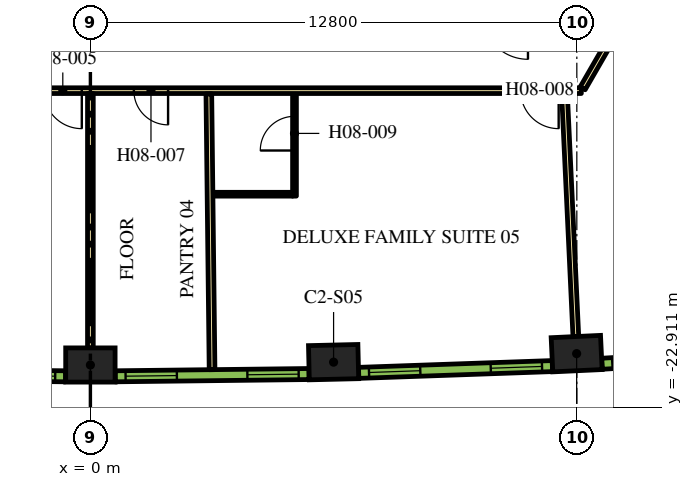
"""IFC4 building model, lengths in metres.
Left out: names, types, materials, properties, quantities, classifications, styles, units other than length and angle.
Written with IfcOpenShell. Run it as: python <this file> out.ifc"""

import sys

from ifc_helpers import new_model, si_unit, direction, frame, frame_2d, origin, origin_2d, place, context, subcontext, project, spatial, rectangle, extrude, element, fill, save


model = new_model("IFC4")
c1 = context("Model", 3, precision=1e-05, world=origin(), true_north=direction((0.0, 1.0)))
c2 = subcontext(c1, "Body", "Model", "MODEL_VIEW")
j1 = project(units=[si_unit("LENGTHUNIT", "METRE"), si_unit("PLANEANGLEUNIT", "RADIAN")], contexts=[c1])
p1 = place(None, origin())
s1 = spatial("IfcSite", under=j1, at=p1, CompositionType="ELEMENT")
p2 = place(p1, origin())
s2 = spatial("IfcBuilding", under=s1, at=p2, CompositionType="ELEMENT")
p3 = place(p2, frame((0.0, 0.0, 114.9)))
s3 = spatial("IfcBuildingStorey", under=s2, at=p3, CompositionType="ELEMENT", Elevation=114.9)
for number, where, z_axis, x_axis in (
    (1, (0.0, -21.794, 0.0), (0.0, 0.0, 1.0), (1.0, 0.0, 0.0)),
    (2, (6.399, -21.719, 0.0), (0.0, 0.0, 1.0), (1.0, 0.023, 0.0)),
    (3, (12.795, -21.494, 0.0), (0.0, 0.0, 1.0), (0.999, 0.047, 0.0)),
):
    element("IfcColumn", number, at=place(p3, frame(where, z_axis=z_axis, x_axis=x_axis)), inside=s3, PredefinedType="COLUMN", context=c2, shape_type="SweptSolid", body=[
        extrude(rectangle(XDim=1.3, YDim=0.9, at=origin_2d()), origin(), (0.0, 0.0, 1.0), 3.9),
    ])
p4 = place(p3, frame((12.918, -14.575, 0.0), z_axis=(0.0, 0.0, 1.0), x_axis=(-1.0, 0.0, 0.0)))
e4 = element("IfcWall", 4, at=p4, inside=s3, PredefinedType="PARTITIONING", context=c2, shape_type="SweptSolid", body=[
    extrude(rectangle(XDim=25.766, YDim=0.15, at=frame_2d((12.883, 0.0))), origin(), (0.0, 0.0, 1.0), 2.75),
])
p5 = place(p4, frame((24.586, 0.0, 0.0)))
e5 = element("IfcOpeningElement", 5, at=p5, cuts=e4, PredefinedType="OPENING", context=c2, shape_type="SweptSolid", body=[
    extrude(rectangle(XDim=1.0, YDim=2.1, at=frame_2d((0.5, 1.05))), frame((0.0, 0.085, 0.0), z_axis=(0.0, -1.0, 0.0), x_axis=(1.0, 0.0, 0.0)), (0.0, 0.0, 1.0), 0.17),
])
p6 = place(p4, frame((13.144, 0.0, 0.0)))
e6 = element("IfcOpeningElement", 6, at=p6, cuts=e4, PredefinedType="OPENING", context=c2, shape_type="SweptSolid", body=[
    extrude(rectangle(XDim=1.0, YDim=2.1, at=frame_2d((0.5, 1.05))), frame((0.0, 0.085, 0.0), z_axis=(0.0, -1.0, 0.0), x_axis=(1.0, 0.0, 0.0)), (0.0, 0.0, 1.0), 0.17),
])
p7 = place(p4, frame((10.874, 0.0, 0.0)))
e7 = element("IfcOpeningElement", 7, at=p7, cuts=e4, PredefinedType="OPENING", context=c2, shape_type="SweptSolid", body=[
    extrude(rectangle(XDim=0.9, YDim=2.1, at=frame_2d((0.45, 1.05))), frame((0.0, 0.085, 0.0), z_axis=(0.0, -1.0, 0.0), x_axis=(1.0, 0.0, 0.0)), (0.0, 0.0, 1.0), 0.17),
])
p8 = place(p4, frame((0.596, 0.0, 0.0)))
e8 = element("IfcOpeningElement", 8, at=p8, cuts=e4, PredefinedType="OPENING", context=c2, shape_type="SweptSolid", body=[
    extrude(rectangle(XDim=1.0, YDim=2.1, at=frame_2d((0.5, 1.05))), frame((0.0, 0.085, 0.0), z_axis=(0.0, -1.0, 0.0), x_axis=(1.0, 0.0, 0.0)), (0.0, 0.0, 1.0), 0.17),
])
p9 = place(p3, frame((15.587, -9.952, 0.0), z_axis=(0.0, 0.0, 1.0), x_axis=(-0.500016618951, -0.866015808616, 0.0)))
e9 = element("IfcWall", 9, at=p9, inside=s3, PredefinedType="PARTITIONING", context=c2, shape_type="SweptSolid", body=[
    extrude(rectangle(XDim=5.268, YDim=0.15, at=frame_2d((2.634, 0.0))), origin(), (0.0, 0.0, 1.0), 2.75),
])
p10 = place(p3, frame((0.0, -21.344, 0.0), z_axis=(0.0, 0.0, 1.0), x_axis=(0.0, 1.0, 0.0)))
e10 = element("IfcWall", 10, at=p10, inside=s3, PredefinedType="PARTITIONING", context=c2, shape_type="SweptSolid", body=[
    extrude(rectangle(XDim=6.694, YDim=0.15, at=frame_2d((3.347, 0.0))), origin(), (0.0, 0.0, 1.0), 2.75),
])
p11 = place(p3, frame((3.202, -21.916, 0.0), z_axis=(0.0, 0.0, 1.0), x_axis=(-0.011707696285, 0.999931462575, 0.0)))
e11 = element("IfcWall", 11, at=p11, inside=s3, PredefinedType="PARTITIONING", context=c2, shape_type="SweptSolid", body=[
    extrude(rectangle(XDim=7.257, YDim=0.15, at=frame_2d((3.628, 0.0))), origin(), (0.0, 0.0, 1.0), 2.75),
])
p12 = place(p3, frame((12.774, -21.045, 0.0), z_axis=(0.0, 0.0, 1.0), x_axis=(-0.046750341626, 0.998906605023, 0.0)))
e12 = element("IfcWall", 12, at=p12, inside=s3, PredefinedType="PARTITIONING", context=c2, shape_type="SweptSolid", body=[
    extrude(rectangle(XDim=6.392, YDim=0.15, at=frame_2d((3.196, 0.0))), origin(), (0.0, 0.0, 1.0), 2.75),
])
p13 = place(p3, frame((5.371, -17.35, 0.0), z_axis=(0.0, 0.0, 1.0), x_axis=(0.0, 1.0, 0.0)))
e13 = element("IfcWall", 13, at=p13, inside=s3, PredefinedType="PARTITIONING", context=c2, shape_type="SweptSolid", body=[
    extrude(rectangle(XDim=2.7, YDim=0.1, at=frame_2d((1.35, 0.0))), origin(), (0.0, 0.0, 1.0), 2.75),
])
p14 = place(p13, frame((1.2, 0.0, 0.0)))
e14 = element("IfcOpeningElement", 14, at=p14, cuts=e13, PredefinedType="OPENING", context=c2, shape_type="SweptSolid", body=[
    extrude(rectangle(XDim=0.9, YDim=2.1, at=frame_2d((0.45, 1.05))), frame((0.0, 0.06, 0.0), z_axis=(0.0, -1.0, 0.0), x_axis=(1.0, 0.0, 0.0)), (0.0, 0.0, 1.0), 0.12),
])
p15 = place(p3, frame((5.321, -17.3, 0.0), z_axis=(0.0, 0.0, 1.0), x_axis=(-1.0, 0.0, 0.0)))
e15 = element("IfcWall", 15, at=p15, inside=s3, PredefinedType="PARTITIONING", context=c2, shape_type="SweptSolid", body=[
    extrude(rectangle(XDim=2.09, YDim=0.1, at=frame_2d((1.045, 0.0))), origin(), (0.0, 0.0, 1.0), 2.75),
])
p16 = place(p3, frame((-5.753, -22.031, 0.0), z_axis=(0.0, 0.0, 1.0), x_axis=(0.999931786565, -0.011679992145, 0.0)))
e16 = element("IfcWall", 16, at=p16, inside=s3, PredefinedType="SOLIDWALL", context=c2, shape_type="SweptSolid", body=[
    extrude(rectangle(XDim=5.1, YDim=0.29, at=frame_2d((2.55, 0.0))), origin(), (0.0, 0.0, 1.0), 3.65),
])
p17 = place(p16, frame((0.272, 0.0, 0.9)))
e17 = element("IfcOpeningElement", 17, at=p17, cuts=e16, PredefinedType="OPENING", context=c2, shape_type="SweptSolid", body=[
    extrude(rectangle(XDim=1.35, YDim=2.15, at=frame_2d((0.675, 1.075))), frame((0.0, 0.155, 0.0), z_axis=(0.0, -1.0, 0.0), x_axis=(1.0, 0.0, 0.0)), (0.0, 0.0, 1.0), 0.31),
])
p18 = place(p16, frame((3.478, 0.0, 0.9)))
e18 = element("IfcOpeningElement", 18, at=p18, cuts=e16, PredefinedType="OPENING", context=c2, shape_type="SweptSolid", body=[
    extrude(rectangle(XDim=1.35, YDim=2.15, at=frame_2d((0.675, 1.075))), frame((0.0, 0.155, 0.0), z_axis=(0.0, -1.0, 0.0), x_axis=(1.0, 0.0, 0.0)), (0.0, 0.0, 1.0), 0.31),
])
p19 = place(p3, frame((0.653, -22.091, 0.0), z_axis=(0.0, 0.0, 1.0), x_axis=(0.999931786565, 0.011679992145, 0.0)))
e19 = element("IfcWall", 19, at=p19, inside=s3, PredefinedType="SOLIDWALL", context=c2, shape_type="SweptSolid", body=[
    extrude(rectangle(XDim=5.1, YDim=0.29, at=frame_2d((2.55, 0.0))), origin(), (0.0, 0.0, 1.0), 3.65),
])
p20 = place(p19, frame((0.273, 0.0, 0.9)))
e20 = element("IfcOpeningElement", 20, at=p20, cuts=e19, PredefinedType="OPENING", context=c2, shape_type="SweptSolid", body=[
    extrude(rectangle(XDim=1.35, YDim=2.15, at=frame_2d((0.675, 1.075))), frame((0.0, 0.155, 0.0), z_axis=(0.0, -1.0, 0.0), x_axis=(1.0, 0.0, 0.0)), (0.0, 0.0, 1.0), 0.31),
])
p21 = place(p19, frame((3.478, 0.0, 0.9)))
e21 = element("IfcOpeningElement", 21, at=p21, cuts=e19, PredefinedType="OPENING", context=c2, shape_type="SweptSolid", body=[
    extrude(rectangle(XDim=1.35, YDim=2.15, at=frame_2d((0.675, 1.075))), frame((0.0, 0.155, 0.0), z_axis=(0.0, -1.0, 0.0), x_axis=(1.0, 0.0, 0.0)), (0.0, 0.0, 1.0), 0.31),
])
p22 = place(p3, frame((7.059, -22.001, 0.0), z_axis=(0.0, 0.0, 1.0), x_axis=(0.999385993957, 0.035037623812, 0.0)))
e22 = element("IfcWall", 22, at=p22, inside=s3, PredefinedType="SOLIDWALL", context=c2, shape_type="SweptSolid", body=[
    extrude(rectangle(XDim=5.101, YDim=0.29, at=frame_2d((2.55, 0.0))), origin(), (0.0, 0.0, 1.0), 3.65),
])
p23 = place(p22, frame((0.273, 0.0, 0.9)))
e23 = element("IfcOpeningElement", 23, at=p23, cuts=e22, PredefinedType="OPENING", context=c2, shape_type="SweptSolid", body=[
    extrude(rectangle(XDim=1.35, YDim=2.15, at=frame_2d((0.675, 1.075))), frame((0.0, 0.155, 0.0), z_axis=(0.0, -1.0, 0.0), x_axis=(1.0, 0.0, 0.0)), (0.0, 0.0, 1.0), 0.31),
])
p24 = place(p22, frame((3.478, 0.0, 0.9)))
e24 = element("IfcOpeningElement", 24, at=p24, cuts=e22, PredefinedType="OPENING", context=c2, shape_type="SweptSolid", body=[
    extrude(rectangle(XDim=1.35, YDim=2.15, at=frame_2d((0.675, 1.075))), frame((0.0, 0.155, 0.0), z_axis=(0.0, -1.0, 0.0), x_axis=(1.0, 0.0, 0.0)), (0.0, 0.0, 1.0), 0.31),
])
p25 = place(p3, frame((13.462, -21.761, 0.0), z_axis=(0.0, 0.0, 1.0), x_axis=(0.998290511436, 0.058447025388, 0.0)))
e25 = element("IfcWall", 25, at=p25, inside=s3, PredefinedType="SOLIDWALL", context=c2, shape_type="SweptSolid", body=[
    extrude(rectangle(XDim=5.1, YDim=0.29, at=frame_2d((2.55, 0.0))), origin(), (0.0, 0.0, 1.0), 3.65),
])
p26 = place(p25, frame((0.272, 0.0, 0.9)))
e26 = element("IfcOpeningElement", 26, at=p26, cuts=e25, PredefinedType="OPENING", context=c2, shape_type="SweptSolid", body=[
    extrude(rectangle(XDim=1.35, YDim=2.15, at=frame_2d((0.675, 1.075))), frame((0.0, 0.155, 0.0), z_axis=(0.0, -1.0, 0.0), x_axis=(1.0, 0.0, 0.0)), (0.0, 0.0, 1.0), 0.31),
])
p27 = place(p25, frame((3.478, 0.0, 0.9)))
e27 = element("IfcOpeningElement", 27, at=p27, cuts=e25, PredefinedType="OPENING", context=c2, shape_type="SweptSolid", body=[
    extrude(rectangle(XDim=1.35, YDim=2.15, at=frame_2d((0.675, 1.075))), frame((0.0, 0.155, 0.0), z_axis=(0.0, -1.0, 0.0), x_axis=(1.0, 0.0, 0.0)), (0.0, 0.0, 1.0), 0.31),
])
p28 = place(p6, origin())
e28 = element("IfcDoor", 28, at=p28, inside=s3, OperationType="SINGLE_SWING_LEFT", PredefinedType="DOOR", context=c2, shape_type="SweptSolid", body=[
    extrude(rectangle(XDim=1.0, YDim=2.1, at=frame_2d((0.5, 1.05))), frame((0.0, 0.025, 0.0), z_axis=(0.0, -1.0, 0.0), x_axis=(1.0, 0.0, 0.0)), (0.0, 0.0, 1.0), 0.05),
])
fill(e6, e28)
p29 = place(p7, origin())
e29 = element("IfcDoor", 29, at=p29, inside=s3, OperationType="SINGLE_SWING_RIGHT", PredefinedType="DOOR", context=c2, shape_type="SweptSolid", body=[
    extrude(rectangle(XDim=0.9, YDim=2.1, at=frame_2d((0.45, 1.05))), frame((0.0, 0.025, 0.0), z_axis=(0.0, -1.0, 0.0), x_axis=(1.0, 0.0, 0.0)), (0.0, 0.0, 1.0), 0.05),
])
fill(e7, e29)
p30 = place(p8, origin())
e30 = element("IfcDoor", 30, at=p30, inside=s3, OperationType="SINGLE_SWING_LEFT", PredefinedType="DOOR", context=c2, shape_type="SweptSolid", body=[
    extrude(rectangle(XDim=1.0, YDim=2.1, at=frame_2d((0.5, 1.05))), frame((0.0, 0.025, 0.0), z_axis=(0.0, -1.0, 0.0), x_axis=(1.0, 0.0, 0.0)), (0.0, 0.0, 1.0), 0.05),
])
fill(e8, e30)
p31 = place(p14, origin())
e31 = element("IfcDoor", 31, at=p31, inside=s3, OperationType="SINGLE_SWING_LEFT", PredefinedType="DOOR", context=c2, shape_type="SweptSolid", body=[
    extrude(rectangle(XDim=0.9, YDim=2.1, at=frame_2d((0.45, 1.05))), frame((0.0, 0.025, 0.0), z_axis=(0.0, -1.0, 0.0), x_axis=(1.0, 0.0, 0.0)), (0.0, 0.0, 1.0), 0.05),
])
fill(e14, e31)
p32 = place(p18, origin())
e32 = element("IfcWindow", 32, at=p32, inside=s3, PartitioningType="DOUBLE_PANEL_VERTICAL", PredefinedType="WINDOW", context=c2, shape_type="SweptSolid", body=[
    extrude(rectangle(XDim=1.35, YDim=2.15, at=frame_2d((0.675, 1.075))), frame((0.0, 0.015, 0.0), z_axis=(0.0, -1.0, 0.0), x_axis=(1.0, 0.0, 0.0)), (0.0, 0.0, 1.0), 0.06),
])
fill(e18, e32)
p33 = place(p20, origin())
e33 = element("IfcWindow", 33, at=p33, inside=s3, PartitioningType="DOUBLE_PANEL_VERTICAL", PredefinedType="WINDOW", context=c2, shape_type="SweptSolid", body=[
    extrude(rectangle(XDim=1.35, YDim=2.15, at=frame_2d((0.675, 1.075))), frame((0.0, 0.015, 0.0), z_axis=(0.0, -1.0, 0.0), x_axis=(1.0, 0.0, 0.0)), (0.0, 0.0, 1.0), 0.06),
])
fill(e20, e33)
p34 = place(p21, origin())
e34 = element("IfcWindow", 34, at=p34, inside=s3, PartitioningType="DOUBLE_PANEL_VERTICAL", PredefinedType="WINDOW", context=c2, shape_type="SweptSolid", body=[
    extrude(rectangle(XDim=1.35, YDim=2.15, at=frame_2d((0.675, 1.075))), frame((0.0, 0.015, 0.0), z_axis=(0.0, -1.0, 0.0), x_axis=(1.0, 0.0, 0.0)), (0.0, 0.0, 1.0), 0.06),
])
fill(e21, e34)
p35 = place(p23, origin())
e35 = element("IfcWindow", 35, at=p35, inside=s3, PartitioningType="DOUBLE_PANEL_VERTICAL", PredefinedType="WINDOW", context=c2, shape_type="SweptSolid", body=[
    extrude(rectangle(XDim=1.35, YDim=2.15, at=frame_2d((0.675, 1.075))), frame((0.0, 0.015, 0.0), z_axis=(0.0, -1.0, 0.0), x_axis=(1.0, 0.0, 0.0)), (0.0, 0.0, 1.0), 0.06),
])
fill(e23, e35)
p36 = place(p24, origin())
e36 = element("IfcWindow", 36, at=p36, inside=s3, PartitioningType="DOUBLE_PANEL_VERTICAL", PredefinedType="WINDOW", context=c2, shape_type="SweptSolid", body=[
    extrude(rectangle(XDim=1.35, YDim=2.15, at=frame_2d((0.675, 1.075))), frame((0.0, 0.015, 0.0), z_axis=(0.0, -1.0, 0.0), x_axis=(1.0, 0.0, 0.0)), (0.0, 0.0, 1.0), 0.06),
])
fill(e24, e36)
p37 = place(p26, origin())
e37 = element("IfcWindow", 37, at=p37, inside=s3, PartitioningType="DOUBLE_PANEL_VERTICAL", PredefinedType="WINDOW", context=c2, shape_type="SweptSolid", body=[
    extrude(rectangle(XDim=1.35, YDim=2.15, at=frame_2d((0.675, 1.075))), frame((0.0, 0.015, 0.0), z_axis=(0.0, -1.0, 0.0), x_axis=(1.0, 0.0, 0.0)), (0.0, 0.0, 1.0), 0.06),
])
fill(e26, e37)
save(model, sys.argv[1])
